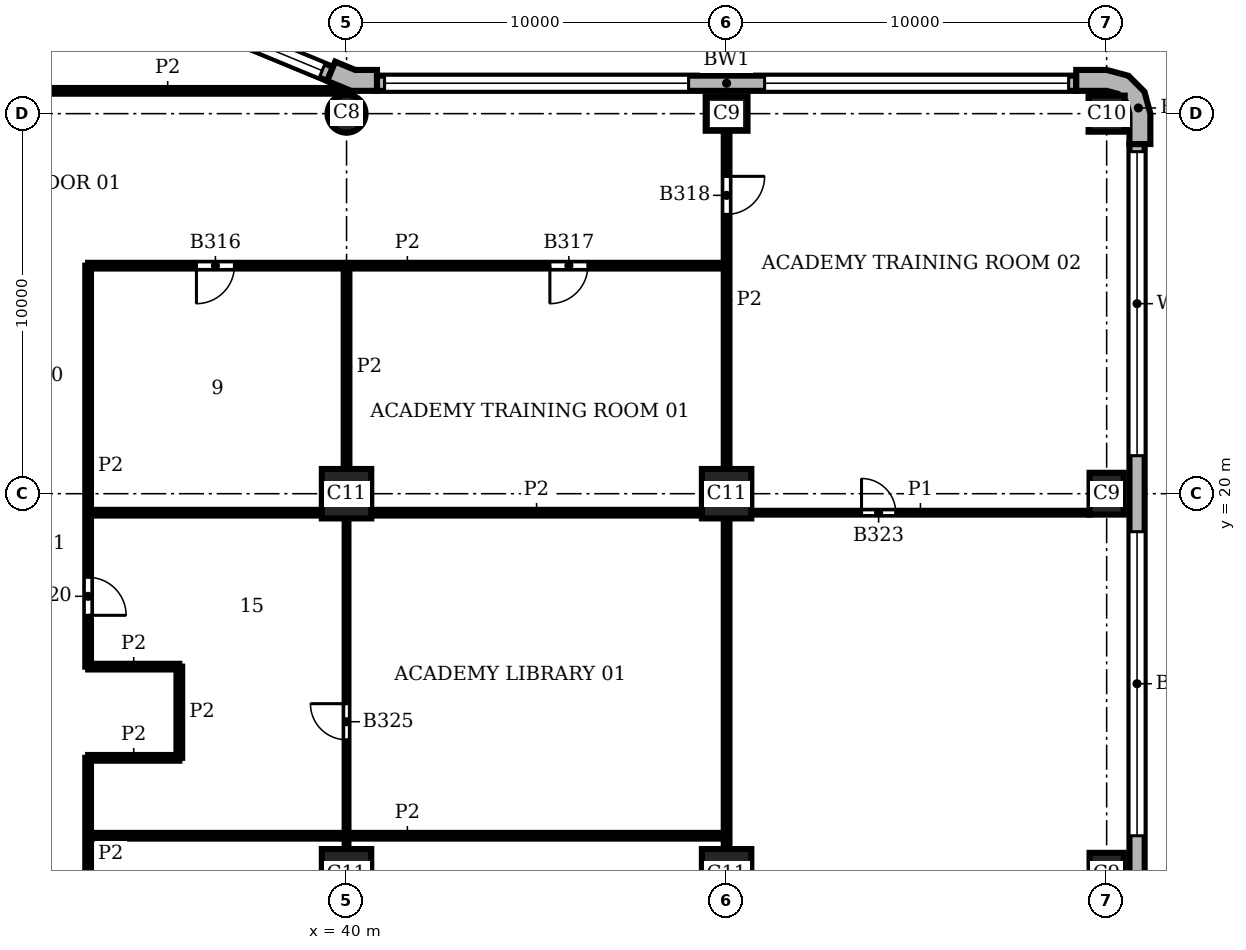
"""IFC4 building model, lengths in metres.
Left out: names, types, materials, properties, quantities, classifications, styles, units other than length and angle.
Written with IfcOpenShell. Run it as: python <this file> out.ifc"""

import sys

from ifc_helpers import new_model, si_unit, direction, frame, frame_2d, origin, origin_2d, place, context, subcontext, project, spatial, polyline, rectangle, circle, outline, extrude, element, fill, save


model = new_model("IFC4")
c1 = context("Model", 3, precision=1e-05, world=origin(), true_north=direction((0.0, 1.0)))
c2 = subcontext(c1, "Body", "Model", "MODEL_VIEW")
j1 = project(units=[si_unit("LENGTHUNIT", "METRE"), si_unit("PLANEANGLEUNIT", "RADIAN")], contexts=[c1])
p1 = place(None, origin())
s1 = spatial("IfcSite", under=j1, at=p1, CompositionType="ELEMENT")
p2 = place(p1, origin())
s2 = spatial("IfcBuilding", under=s1, at=p2, CompositionType="ELEMENT")
p3 = place(p2, frame((0.0, 0.0, 155.1)))
s3 = spatial("IfcBuildingStorey", under=s2, at=p3, CompositionType="ELEMENT", Elevation=155.1)
for number, where, z_axis, x_axis in (
    (1, (60.0, 10.0, 0.0), (0.0, 0.0, 1.0), (0.0, 1.0, 0.0)),
    (2, (60.0, 20.0, 0.0), (0.0, 0.0, 1.0), (0.0, 1.0, 0.0)),
):
    element("IfcColumn", number, at=place(p3, frame(where, z_axis=z_axis, x_axis=x_axis)), inside=s3, PredefinedType="COLUMN", context=c2, shape_type="SweptSolid", body=[
        extrude(rectangle(XDim=1.1, YDim=0.9, at=origin_2d()), origin(), (0.0, 0.0, 1.0), 3.9),
    ])
p4 = place(p3, frame((60.0, 30.0, 0.0), z_axis=(0.0, 0.0, 1.0), x_axis=(1.0, 0.0, 0.0)))
e3 = element("IfcColumn", 3, at=p4, inside=s3, PredefinedType="COLUMN", context=c2, shape_type="SweptSolid", body=[
    extrude(rectangle(XDim=0.95, YDim=0.95, at=origin_2d()), origin(), (0.0, 0.0, 1.0), 3.9),
])
p5 = place(p3, frame((50.0, 30.0, 0.0), z_axis=(0.0, 0.0, 1.0), x_axis=(1.0, 0.0, 0.0)))
e4 = element("IfcColumn", 4, at=p5, inside=s3, PredefinedType="COLUMN", context=c2, shape_type="SweptSolid", body=[
    extrude(rectangle(XDim=1.1, YDim=0.9, at=origin_2d()), origin(), (0.0, 0.0, 1.0), 3.9),
])
p6 = place(p3, frame((40.0, 30.0, 0.0), z_axis=(0.0, 0.0, 1.0), x_axis=(1.0, 0.0, 0.0)))
e5 = element("IfcColumn", 5, at=p6, inside=s3, PredefinedType="COLUMN", context=c2, shape_type="SweptSolid", body=[
    extrude(circle(Radius=0.5, at=origin_2d()), origin(), (0.0, 0.0, 1.0), 3.9),
])
for number, where, z_axis, x_axis in (
    (6, (40.0, 10.0, 0.0), (0.0, 0.0, 1.0), (1.0, 0.0, 0.0)),
    (7, (40.0, 20.0, 0.0), (0.0, 0.0, 1.0), (1.0, 0.0, 0.0)),
    (8, (50.0, 10.0, 0.0), (0.0, 0.0, 1.0), (1.0, 0.0, 0.0)),
    (9, (50.0, 20.0, 0.0), (0.0, 0.0, 1.0), (1.0, 0.0, 0.0)),
):
    element("IfcColumn", number, at=place(p3, frame(where, z_axis=z_axis, x_axis=x_axis)), inside=s3, PredefinedType="COLUMN", context=c2, shape_type="SweptSolid", body=[
        extrude(rectangle(XDim=1.3, YDim=1.3, at=origin_2d()), origin(), (0.0, 0.0, 1.0), 3.9),
    ])
p7 = place(p3, origin())
e10 = element("IfcWall", 10, at=p7, inside=s3, PredefinedType="SOLIDWALL", context=c2, shape_type="SweptSolid", body=[
    extrude(outline(polyline([(61.0, 29.2), (61.15, 29.2), (61.15, 30.0), (60.996, 30.575), (60.575, 30.996), (60.0, 31.15), (59.2, 31.15), (59.2, 31.0), (59.2, 30.6), (60.0, 30.6), (60.3, 30.52), (60.52, 30.3), (60.6, 30.0), (60.6, 29.2), (61.0, 29.2)])), origin(), (0.0, 0.0, 1.0), 3.9),
])
e11 = element("IfcWall", 11, at=p7, inside=s3, PredefinedType="SOLIDWALL", context=c2, shape_type="SweptSolid", body=[
    extrude(outline(polyline([(40.8, 31.0), (40.8, 31.15), (40.229, 31.15), (39.701, 31.369), (39.644, 31.23), (39.49, 30.861), (40.119, 30.6), (40.8, 30.6), (40.8, 31.0)])), origin(), (0.0, 0.0, 1.0), 3.9),
])
p8 = place(p3, frame((60.8, 0.8, 0.0), z_axis=(0.0, 0.0, 1.0), x_axis=(0.0, 1.0, 0.0)))
e12 = element("IfcWall", 12, at=p8, inside=s3, PredefinedType="SOLIDWALL", context=c2, shape_type="SweptSolid", body=[
    extrude(rectangle(XDim=28.4, YDim=0.4, at=frame_2d((14.2, 0.0))), origin(), (0.0, 0.0, 1.0), 3.9),
])
p9 = place(p8, frame((0.2, 0.0, 0.9)))
e13 = element("IfcOpeningElement", 13, at=p9, cuts=e12, PredefinedType="OPENING", context=c2, shape_type="SweptSolid", body=[
    extrude(rectangle(XDim=8.0, YDim=2.35, at=frame_2d((4.0, 1.175))), frame((0.0, 0.21, 0.0), z_axis=(0.0, -1.0, 0.0), x_axis=(1.0, 0.0, 0.0)), (0.0, 0.0, 1.0), 0.42),
])
p10 = place(p8, frame((10.2, 0.0, 0.9)))
e14 = element("IfcOpeningElement", 14, at=p10, cuts=e12, PredefinedType="OPENING", context=c2, shape_type="SweptSolid", body=[
    extrude(rectangle(XDim=8.0, YDim=2.35, at=frame_2d((4.0, 1.175))), frame((0.0, 0.21, 0.0), z_axis=(0.0, -1.0, 0.0), x_axis=(1.0, 0.0, 0.0)), (0.0, 0.0, 1.0), 0.42),
])
p11 = place(p8, frame((20.2, 0.0, 0.9)))
e15 = element("IfcOpeningElement", 15, at=p11, cuts=e12, PredefinedType="OPENING", context=c2, shape_type="SweptSolid", body=[
    extrude(rectangle(XDim=8.0, YDim=2.35, at=frame_2d((4.0, 1.175))), frame((0.0, 0.21, 0.0), z_axis=(0.0, -1.0, 0.0), x_axis=(1.0, 0.0, 0.0)), (0.0, 0.0, 1.0), 0.42),
])
p12 = place(p3, frame((59.2, 30.8, 0.0), z_axis=(0.0, 0.0, 1.0), x_axis=(-1.0, 0.0, 0.0)))
e16 = element("IfcWall", 16, at=p12, inside=s3, PredefinedType="SOLIDWALL", context=c2, shape_type="SweptSolid", body=[
    extrude(rectangle(XDim=18.4, YDim=0.4, at=frame_2d((9.2, 0.0))), origin(), (0.0, 0.0, 1.0), 3.9),
])
p13 = place(p12, frame((0.2, 0.0, 0.9)))
e17 = element("IfcOpeningElement", 17, at=p13, cuts=e16, PredefinedType="OPENING", context=c2, shape_type="SweptSolid", body=[
    extrude(rectangle(XDim=8.0, YDim=2.35, at=frame_2d((4.0, 1.175))), frame((0.0, 0.21, 0.0), z_axis=(0.0, -1.0, 0.0), x_axis=(1.0, 0.0, 0.0)), (0.0, 0.0, 1.0), 0.42),
])
p14 = place(p12, frame((10.2, 0.0, 0.9)))
e18 = element("IfcOpeningElement", 18, at=p14, cuts=e16, PredefinedType="OPENING", context=c2, shape_type="SweptSolid", body=[
    extrude(rectangle(XDim=8.0, YDim=2.35, at=frame_2d((4.0, 1.175))), frame((0.0, 0.21, 0.0), z_axis=(0.0, -1.0, 0.0), x_axis=(1.0, 0.0, 0.0)), (0.0, 0.0, 1.0), 0.42),
])
p15 = place(p3, frame((39.567, 31.045, 0.0), z_axis=(0.0, 0.0, 1.0), x_axis=(-0.923891000409, 0.382655745237, 0.0)))
e19 = element("IfcWall", 19, at=p15, inside=s3, PredefinedType="SOLIDWALL", context=c2, shape_type="SweptSolid", body=[
    extrude(rectangle(XDim=6.053, YDim=0.4, at=frame_2d((3.027, 0.0))), origin(), (0.0, 0.0, 1.0), 3.9),
])
p16 = place(p15, frame((0.227, 0.0, 0.9)))
e20 = element("IfcOpeningElement", 20, at=p16, cuts=e19, PredefinedType="OPENING", context=c2, shape_type="SweptSolid", body=[
    extrude(rectangle(XDim=5.6, YDim=2.35, at=frame_2d((2.8, 1.175))), frame((0.0, 0.21, 0.0), z_axis=(0.0, -1.0, 0.0), x_axis=(1.0, 0.0, 0.0)), (0.0, 0.0, 1.0), 0.42),
])
p17 = place(p3, frame((40.0, 10.65, 0.0), z_axis=(0.0, 0.0, 1.0), x_axis=(0.0, 1.0, 0.0)))
e21 = element("IfcWall", 21, at=p17, inside=s3, PredefinedType="PARTITIONING", context=c2, shape_type="SweptSolid", body=[
    extrude(rectangle(XDim=8.7, YDim=0.1, at=frame_2d((4.35, 0.0))), origin(), (0.0, 0.0, 1.0), 3.58),
])
p18 = place(p17, frame((2.875, 0.0, 0.0)))
e22 = element("IfcOpeningElement", 22, at=p18, cuts=e21, PredefinedType="OPENING", context=c2, shape_type="SweptSolid", body=[
    extrude(rectangle(XDim=0.95, YDim=2.1, at=frame_2d((0.475, 1.05))), frame((0.0, 0.06, 0.0), z_axis=(0.0, -1.0, 0.0), x_axis=(1.0, 0.0, 0.0)), (0.0, 0.0, 1.0), 0.12),
])
p19 = place(p3, frame((50.65, 19.5, 0.0), z_axis=(0.0, 0.0, 1.0), x_axis=(1.0, 0.0, 0.0)))
e23 = element("IfcWall", 23, at=p19, inside=s3, PredefinedType="PARTITIONING", context=c2, shape_type="SweptSolid", body=[
    extrude(rectangle(XDim=8.9, YDim=0.1, at=frame_2d((4.45, 0.0))), origin(), (0.0, 0.0, 1.0), 3.58),
])
p20 = place(p19, frame((2.9, 0.0, 0.0)))
e24 = element("IfcOpeningElement", 24, at=p20, cuts=e23, PredefinedType="OPENING", context=c2, shape_type="SweptSolid", body=[
    extrude(rectangle(XDim=0.9, YDim=2.1, at=frame_2d((0.45, 1.05))), frame((0.0, 0.06, 0.0), z_axis=(0.0, -1.0, 0.0), x_axis=(1.0, 0.0, 0.0)), (0.0, 0.0, 1.0), 0.12),
])
p21 = place(p3, frame((33.2, 8.0, 0.0), z_axis=(0.0, 0.0, 1.0), x_axis=(0.0, 1.0, 0.0)))
e25 = element("IfcWall", 25, at=p21, inside=s3, PredefinedType="PARTITIONING", context=c2, shape_type="SweptSolid", body=[
    extrude(rectangle(XDim=5.05, YDim=0.15, at=frame_2d((2.525, 0.0))), origin(), (0.0, 0.0, 1.0), 3.58),
])
p22 = place(p3, frame((33.2, 15.45, 0.0), z_axis=(0.0, 0.0, 1.0), x_axis=(0.0, 1.0, 0.0)))
e26 = element("IfcWall", 26, at=p22, inside=s3, PredefinedType="PARTITIONING", context=c2, shape_type="SweptSolid", body=[
    extrude(rectangle(XDim=10.55, YDim=0.15, at=frame_2d((5.275, 0.0))), origin(), (0.0, 0.0, 1.0), 3.58),
])
p23 = place(p22, frame((1.35, 0.0, 0.0)))
e27 = element("IfcOpeningElement", 27, at=p23, cuts=e26, PredefinedType="OPENING", context=c2, shape_type="SweptSolid", body=[
    extrude(rectangle(XDim=1.0, YDim=2.1, at=frame_2d((0.5, 1.05))), frame((0.0, 0.085, 0.0), z_axis=(0.0, -1.0, 0.0), x_axis=(1.0, 0.0, 0.0)), (0.0, 0.0, 1.0), 0.17),
])
p24 = place(p3, frame((35.6, 13.05, 0.0), z_axis=(0.0, 0.0, 1.0), x_axis=(0.0, 1.0, 0.0)))
e28 = element("IfcWall", 28, at=p24, inside=s3, PredefinedType="PARTITIONING", context=c2, shape_type="SweptSolid", body=[
    extrude(rectangle(XDim=2.4, YDim=0.15, at=frame_2d((1.2, 0.0))), origin(), (0.0, 0.0, 1.0), 3.58),
])
p25 = place(p3, frame((40.0, 20.65, 0.0), z_axis=(0.0, 0.0, 1.0), x_axis=(0.0, 1.0, 0.0)))
e29 = element("IfcWall", 29, at=p25, inside=s3, PredefinedType="PARTITIONING", context=c2, shape_type="SweptSolid", body=[
    extrude(rectangle(XDim=5.35, YDim=0.15, at=frame_2d((2.675, 0.0))), origin(), (0.0, 0.0, 1.0), 3.58),
])
p26 = place(p3, frame((50.0, 10.65, 0.0), z_axis=(0.0, 0.0, 1.0), x_axis=(0.0, 1.0, 0.0)))
e30 = element("IfcWall", 30, at=p26, inside=s3, PredefinedType="PARTITIONING", context=c2, shape_type="SweptSolid", body=[
    extrude(rectangle(XDim=8.7, YDim=0.15, at=frame_2d((4.35, 0.0))), origin(), (0.0, 0.0, 1.0), 3.58),
])
p27 = place(p3, frame((50.0, 20.65, 0.0), z_axis=(0.0, 0.0, 1.0), x_axis=(0.0, 1.0, 0.0)))
e31 = element("IfcWall", 31, at=p27, inside=s3, PredefinedType="PARTITIONING", context=c2, shape_type="SweptSolid", body=[
    extrude(rectangle(XDim=8.9, YDim=0.15, at=frame_2d((4.45, 0.0))), origin(), (0.0, 0.0, 1.0), 3.58),
])
p28 = place(p27, frame((6.7, 0.0, 0.0)))
e32 = element("IfcOpeningElement", 32, at=p28, cuts=e31, PredefinedType="OPENING", context=c2, shape_type="SweptSolid", body=[
    extrude(rectangle(XDim=1.0, YDim=2.1, at=frame_2d((0.5, 1.05))), frame((0.0, 0.085, 0.0), z_axis=(0.0, -1.0, 0.0), x_axis=(1.0, 0.0, 0.0)), (0.0, 0.0, 1.0), 0.17),
])
p29 = place(p3, frame((33.2, 11.0, 0.0), z_axis=(0.0, 0.0, 1.0), x_axis=(1.0, 0.0, 0.0)))
e33 = element("IfcWall", 33, at=p29, inside=s3, PredefinedType="PARTITIONING", context=c2, shape_type="SweptSolid", body=[
    extrude(rectangle(XDim=16.8, YDim=0.15, at=frame_2d((8.4, 0.0))), origin(), (0.0, 0.0, 1.0), 3.58),
])
for number, where, z_axis, x_axis in (
    (34, (33.2, 13.05, 0.0), (0.0, 0.0, 1.0), (1.0, 0.0, 0.0)),
    (35, (33.2, 15.45, 0.0), (0.0, 0.0, 1.0), (1.0, 0.0, 0.0)),
):
    element("IfcWall", number, at=place(p3, frame(where, z_axis=z_axis, x_axis=x_axis)), inside=s3, PredefinedType="PARTITIONING", context=c2, shape_type="SweptSolid", body=[
        extrude(rectangle(XDim=2.4, YDim=0.15, at=frame_2d((1.2, 0.0))), origin(), (0.0, 0.0, 1.0), 3.58),
    ])
p30 = place(p3, frame((33.2, 19.5, 0.0), z_axis=(0.0, 0.0, 1.0), x_axis=(1.0, 0.0, 0.0)))
e36 = element("IfcWall", 36, at=p30, inside=s3, PredefinedType="PARTITIONING", context=c2, shape_type="SweptSolid", body=[
    extrude(rectangle(XDim=6.15, YDim=0.15, at=frame_2d((3.075, 0.0))), origin(), (0.0, 0.0, 1.0), 3.58),
])
p31 = place(p3, frame((40.65, 19.5, 0.0), z_axis=(0.0, 0.0, 1.0), x_axis=(1.0, 0.0, 0.0)))
e37 = element("IfcWall", 37, at=p31, inside=s3, PredefinedType="PARTITIONING", context=c2, shape_type="SweptSolid", body=[
    extrude(rectangle(XDim=8.7, YDim=0.15, at=frame_2d((4.35, 0.0))), origin(), (0.0, 0.0, 1.0), 3.58),
])
p32 = place(p3, frame((33.2, 26.0, 0.0), z_axis=(0.0, 0.0, 1.0), x_axis=(1.0, 0.0, 0.0)))
e38 = element("IfcWall", 38, at=p32, inside=s3, PredefinedType="PARTITIONING", context=c2, shape_type="SweptSolid", body=[
    extrude(rectangle(XDim=16.8, YDim=0.15, at=frame_2d((8.4, 0.0))), origin(), (0.0, 0.0, 1.0), 3.58),
])
p33 = place(p32, frame((2.85, 0.0, 0.0)))
e39 = element("IfcOpeningElement", 39, at=p33, cuts=e38, PredefinedType="OPENING", context=c2, shape_type="SweptSolid", body=[
    extrude(rectangle(XDim=1.0, YDim=2.1, at=frame_2d((0.5, 1.05))), frame((0.0, 0.085, 0.0), z_axis=(0.0, -1.0, 0.0), x_axis=(1.0, 0.0, 0.0)), (0.0, 0.0, 1.0), 0.17),
])
p34 = place(p32, frame((12.15, 0.0, 0.0)))
e40 = element("IfcOpeningElement", 40, at=p34, cuts=e38, PredefinedType="OPENING", context=c2, shape_type="SweptSolid", body=[
    extrude(rectangle(XDim=1.0, YDim=2.1, at=frame_2d((0.5, 1.05))), frame((0.0, 0.085, 0.0), z_axis=(0.0, -1.0, 0.0), x_axis=(1.0, 0.0, 0.0)), (0.0, 0.0, 1.0), 0.17),
])
p35 = place(p3, frame((30.65, 30.6, 0.0), z_axis=(0.0, 0.0, 1.0), x_axis=(1.0, 0.0, 0.0)))
e41 = element("IfcWall", 41, at=p35, inside=s3, PredefinedType="PARTITIONING", context=c2, shape_type="SweptSolid", body=[
    extrude(rectangle(XDim=9.288, YDim=0.15, at=frame_2d((4.644, 0.0))), origin(), (0.0, 0.0, 1.0), 3.58),
])
p36 = place(p10, origin())
e42 = element("IfcWindow", 42, at=p36, inside=s3, PartitioningType="SINGLE_PANEL", PredefinedType="WINDOW", context=c2, shape_type="SweptSolid", body=[
    extrude(rectangle(XDim=8.0, YDim=2.35, at=frame_2d((4.0, 1.175))), frame((0.0, 0.16, 0.0), z_axis=(0.0, -1.0, 0.0), x_axis=(1.0, 0.0, 0.0)), (0.0, 0.0, 1.0), 0.06),
])
fill(e14, e42)
p37 = place(p11, origin())
e43 = element("IfcWindow", 43, at=p37, inside=s3, PartitioningType="SINGLE_PANEL", PredefinedType="WINDOW", context=c2, shape_type="SweptSolid", body=[
    extrude(rectangle(XDim=8.0, YDim=2.35, at=frame_2d((4.0, 1.175))), frame((0.0, 0.16, 0.0), z_axis=(0.0, -1.0, 0.0), x_axis=(1.0, 0.0, 0.0)), (0.0, 0.0, 1.0), 0.06),
])
fill(e15, e43)
p38 = place(p13, origin())
e44 = element("IfcWindow", 44, at=p38, inside=s3, PartitioningType="SINGLE_PANEL", PredefinedType="WINDOW", context=c2, shape_type="SweptSolid", body=[
    extrude(rectangle(XDim=8.0, YDim=2.35, at=frame_2d((4.0, 1.175))), frame((0.0, 0.16, 0.0), z_axis=(0.0, -1.0, 0.0), x_axis=(1.0, 0.0, 0.0)), (0.0, 0.0, 1.0), 0.06),
])
fill(e17, e44)
p39 = place(p14, origin())
e45 = element("IfcWindow", 45, at=p39, inside=s3, PartitioningType="SINGLE_PANEL", PredefinedType="WINDOW", context=c2, shape_type="SweptSolid", body=[
    extrude(rectangle(XDim=8.0, YDim=2.35, at=frame_2d((4.0, 1.175))), frame((0.0, 0.16, 0.0), z_axis=(0.0, -1.0, 0.0), x_axis=(1.0, 0.0, 0.0)), (0.0, 0.0, 1.0), 0.06),
])
fill(e18, e45)
p40 = place(p16, origin())
e46 = element("IfcWindow", 46, at=p40, inside=s3, PartitioningType="SINGLE_PANEL", PredefinedType="WINDOW", context=c2, shape_type="SweptSolid", body=[
    extrude(rectangle(XDim=5.6, YDim=2.35, at=frame_2d((2.8, 1.175))), frame((0.0, 0.16, 0.0), z_axis=(0.0, -1.0, 0.0), x_axis=(1.0, 0.0, 0.0)), (0.0, 0.0, 1.0), 0.06),
])
fill(e20, e46)
p41 = place(p33, frame((1.0, 0.0, 0.0), z_axis=(0.0, 0.0, 1.0), x_axis=(-1.0, 0.0, 0.0)))
e47 = element("IfcDoor", 47, at=p41, inside=s3, OperationType="SINGLE_SWING_RIGHT", PredefinedType="DOOR", context=c2, shape_type="SweptSolid", body=[
    extrude(rectangle(XDim=1.0, YDim=2.1, at=frame_2d((0.5, 1.05))), frame((0.0, 0.025, 0.0), z_axis=(0.0, -1.0, 0.0), x_axis=(1.0, 0.0, 0.0)), (0.0, 0.0, 1.0), 0.05),
])
fill(e39, e47)
p42 = place(p34, frame((1.0, 0.0, 0.0), z_axis=(0.0, 0.0, 1.0), x_axis=(-1.0, 0.0, 0.0)))
e48 = element("IfcDoor", 48, at=p42, inside=s3, OperationType="SINGLE_SWING_RIGHT", PredefinedType="DOOR", context=c2, shape_type="SweptSolid", body=[
    extrude(rectangle(XDim=1.0, YDim=2.1, at=frame_2d((0.5, 1.05))), frame((0.0, 0.025, 0.0), z_axis=(0.0, -1.0, 0.0), x_axis=(1.0, 0.0, 0.0)), (0.0, 0.0, 1.0), 0.05),
])
fill(e40, e48)
p43 = place(p28, frame((1.0, 0.0, 0.0), z_axis=(0.0, 0.0, 1.0), x_axis=(-1.0, 0.0, 0.0)))
e49 = element("IfcDoor", 49, at=p43, inside=s3, OperationType="SINGLE_SWING_LEFT", PredefinedType="DOOR", context=c2, shape_type="SweptSolid", body=[
    extrude(rectangle(XDim=1.0, YDim=2.1, at=frame_2d((0.5, 1.05))), frame((0.0, 0.025, 0.0), z_axis=(0.0, -1.0, 0.0), x_axis=(1.0, 0.0, 0.0)), (0.0, 0.0, 1.0), 0.05),
])
fill(e32, e49)
p44 = place(p23, frame((1.0, 0.0, 0.0), z_axis=(0.0, 0.0, 1.0), x_axis=(-1.0, 0.0, 0.0)))
e50 = element("IfcDoor", 50, at=p44, inside=s3, OperationType="SINGLE_SWING_RIGHT", PredefinedType="DOOR", context=c2, shape_type="SweptSolid", body=[
    extrude(rectangle(XDim=1.0, YDim=2.1, at=frame_2d((0.5, 1.05))), frame((0.0, 0.025, 0.0), z_axis=(0.0, -1.0, 0.0), x_axis=(1.0, 0.0, 0.0)), (0.0, 0.0, 1.0), 0.05),
])
fill(e27, e50)
p45 = place(p20, origin())
e51 = element("IfcDoor", 51, at=p45, inside=s3, OperationType="SINGLE_SWING_LEFT", PredefinedType="DOOR", context=c2, shape_type="SweptSolid", body=[
    extrude(rectangle(XDim=0.9, YDim=2.1, at=frame_2d((0.45, 1.05))), frame((0.0, 0.025, 0.0), z_axis=(0.0, -1.0, 0.0), x_axis=(1.0, 0.0, 0.0)), (0.0, 0.0, 1.0), 0.05),
])
fill(e24, e51)
p46 = place(p18, origin())
e52 = element("IfcDoor", 52, at=p46, inside=s3, OperationType="SINGLE_SWING_RIGHT", PredefinedType="DOOR", context=c2, shape_type="SweptSolid", body=[
    extrude(rectangle(XDim=0.95, YDim=2.1, at=frame_2d((0.475, 1.05))), frame((0.0, 0.025, 0.0), z_axis=(0.0, -1.0, 0.0), x_axis=(1.0, 0.0, 0.0)), (0.0, 0.0, 1.0), 0.05),
])
fill(e22, e52)
save(model, sys.argv[1])
